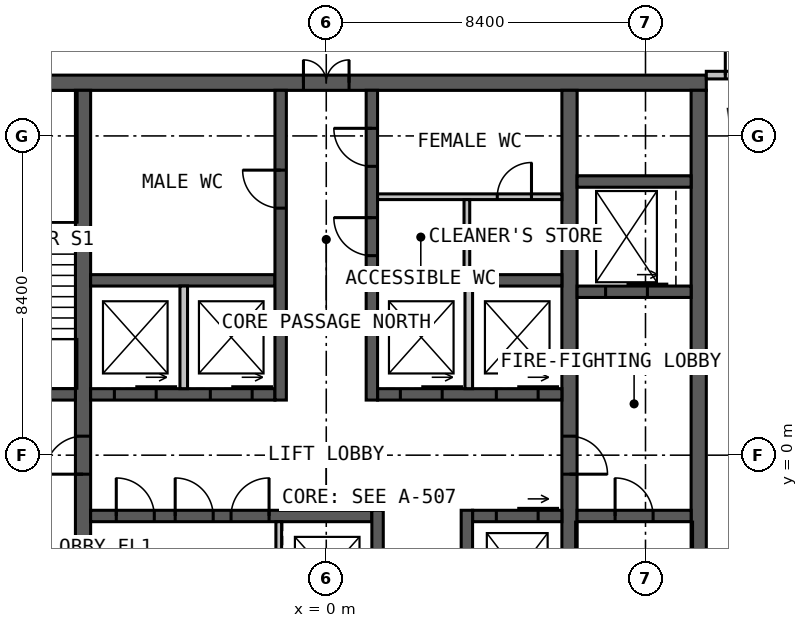
"""IFC4 building model, lengths in metres.
Left out: names, types, materials, properties, quantities, classifications, styles, units other than length and angle.
Written with IfcOpenShell. Run it as: python <this file> out.ifc"""

import sys

from ifc_helpers import new_model, si_unit, direction, frame, frame_2d, origin, place, context, subcontext, project, spatial, rectangle, extrude, element, fill, save


model = new_model("IFC4")
c1 = context("Model", 3, precision=1e-05, world=origin(), true_north=direction((0.0, 1.0)))
c2 = subcontext(c1, "Body", "Model", "MODEL_VIEW")
j1 = project(units=[si_unit("LENGTHUNIT", "METRE"), si_unit("PLANEANGLEUNIT", "RADIAN")], contexts=[c1])
p1 = place(None, origin())
s1 = spatial("IfcSite", under=j1, at=p1, CompositionType="ELEMENT")
p2 = place(p1, origin())
s2 = spatial("IfcBuilding", under=s1, at=p2, CompositionType="ELEMENT")
p3 = place(p2, frame((0.0, 0.0, 256.0)))
s3 = spatial("IfcBuildingStorey", under=s2, at=p3, CompositionType="ELEMENT", Elevation=256.0)
p4 = place(p3, frame((-10.0, 9.8, 0.0), z_axis=(0.0, 0.0, 1.0), x_axis=(1.0, 0.0, 0.0)))
e1 = element("IfcWall", 1, at=p4, inside=s3, PredefinedType="SOLIDWALL", context=c2, shape_type="SweptSolid", body=[
    extrude(rectangle(XDim=20.0, YDim=0.4, at=frame_2d((10.0, 0.0))), origin(), (0.0, 0.0, 1.0), 4.0),
])
p5 = place(p4, frame((9.4, 0.0, 0.0)))
e2 = element("IfcOpeningElement", 2, at=p5, cuts=e1, PredefinedType="OPENING", context=c2, shape_type="SweptSolid", body=[
    extrude(rectangle(XDim=1.2, YDim=2.2, at=frame_2d((0.6, 1.1))), frame((0.0, 0.21, 0.0), z_axis=(0.0, -1.0, 0.0), x_axis=(1.0, 0.0, 0.0)), (0.0, 0.0, 1.0), 0.42),
])
p6 = place(p3, frame((9.8, -9.6, 0.0), z_axis=(0.0, 0.0, 1.0), x_axis=(0.0, 1.0, 0.0)))
e3 = element("IfcWall", 3, at=p6, inside=s3, PredefinedType="SOLIDWALL", context=c2, shape_type="SweptSolid", body=[
    extrude(rectangle(XDim=19.2, YDim=0.4, at=frame_2d((9.6, 0.0))), origin(), (0.0, 0.0, 1.0), 4.0),
])
p7 = place(p3, frame((-6.4, -9.6, 0.0), z_axis=(0.0, 0.0, 1.0), x_axis=(0.0, 1.0, 0.0)))
e4 = element("IfcWall", 4, at=p7, inside=s3, PredefinedType="SOLIDWALL", context=c2, shape_type="SweptSolid", body=[
    extrude(rectangle(XDim=19.2, YDim=0.4, at=frame_2d((9.6, 0.0))), origin(), (0.0, 0.0, 1.0), 4.0),
])
p8 = place(p7, frame((9.1, 0.0, 0.0)))
e5 = element("IfcOpeningElement", 5, at=p8, cuts=e4, PredefinedType="OPENING", context=c2, shape_type="SweptSolid", body=[
    extrude(rectangle(XDim=1.0, YDim=2.2, at=frame_2d((0.5, 1.1))), frame((0.0, 0.21, 0.0), z_axis=(0.0, -1.0, 0.0), x_axis=(1.0, 0.0, 0.0)), (0.0, 0.0, 1.0), 0.42),
])
p9 = place(p3, frame((6.4, 9.6, 0.0), z_axis=(0.0, 0.0, 1.0), x_axis=(0.0, -1.0, 0.0)))
e6 = element("IfcWall", 6, at=p9, inside=s3, PredefinedType="SOLIDWALL", context=c2, shape_type="SweptSolid", body=[
    extrude(rectangle(XDim=19.2, YDim=0.4, at=frame_2d((9.6, 0.0))), origin(), (0.0, 0.0, 1.0), 4.0),
])
p10 = place(p9, frame((9.1, 0.0, 0.0)))
e7 = element("IfcOpeningElement", 7, at=p10, cuts=e6, PredefinedType="OPENING", context=c2, shape_type="SweptSolid", body=[
    extrude(rectangle(XDim=1.0, YDim=2.2, at=frame_2d((0.5, 1.1))), frame((0.0, 0.21, 0.0), z_axis=(0.0, -1.0, 0.0), x_axis=(1.0, 0.0, 0.0)), (0.0, 0.0, 1.0), 0.42),
])
p11 = place(p3, frame((-6.2, 1.6, 0.0), z_axis=(0.0, 0.0, 1.0), x_axis=(1.0, 0.0, 0.0)))
e8 = element("IfcWall", 8, at=p11, inside=s3, PredefinedType="SOLIDWALL", context=c2, shape_type="SweptSolid", body=[
    extrude(rectangle(XDim=4.85, YDim=0.3, at=frame_2d((2.425, 0.0))), origin(), (0.0, 0.0, 1.0), 4.0),
])
p12 = place(p11, frame((0.625, 0.0, 0.0)))
e9 = element("IfcOpeningElement", 9, at=p12, cuts=e8, PredefinedType="OPENING", context=c2, shape_type="SweptSolid", body=[
    extrude(rectangle(XDim=1.1, YDim=2.2, at=frame_2d((0.55, 1.1))), frame((0.0, 0.16, 0.0), z_axis=(0.0, -1.0, 0.0), x_axis=(1.0, 0.0, 0.0)), (0.0, 0.0, 1.0), 0.32),
])
p13 = place(p11, frame((3.15, 0.0, 0.0)))
e10 = element("IfcOpeningElement", 10, at=p13, cuts=e8, PredefinedType="OPENING", context=c2, shape_type="SweptSolid", body=[
    extrude(rectangle(XDim=1.1, YDim=2.2, at=frame_2d((0.55, 1.1))), frame((0.0, 0.16, 0.0), z_axis=(0.0, -1.0, 0.0), x_axis=(1.0, 0.0, 0.0)), (0.0, 0.0, 1.0), 0.32),
])
p14 = place(p3, frame((1.35, 1.6, 0.0), z_axis=(0.0, 0.0, 1.0), x_axis=(1.0, 0.0, 0.0)))
e11 = element("IfcWall", 11, at=p14, inside=s3, PredefinedType="SOLIDWALL", context=c2, shape_type="SweptSolid", body=[
    extrude(rectangle(XDim=4.85, YDim=0.3, at=frame_2d((2.425, 0.0))), origin(), (0.0, 0.0, 1.0), 4.0),
])
p15 = place(p14, frame((0.6, 0.0, 0.0)))
e12 = element("IfcOpeningElement", 12, at=p15, cuts=e11, PredefinedType="OPENING", context=c2, shape_type="SweptSolid", body=[
    extrude(rectangle(XDim=1.1, YDim=2.2, at=frame_2d((0.55, 1.1))), frame((0.0, 0.16, 0.0), z_axis=(0.0, -1.0, 0.0), x_axis=(1.0, 0.0, 0.0)), (0.0, 0.0, 1.0), 0.32),
])
p16 = place(p14, frame((3.125, 0.0, 0.0)))
e13 = element("IfcOpeningElement", 13, at=p16, cuts=e11, PredefinedType="OPENING", context=c2, shape_type="SweptSolid", body=[
    extrude(rectangle(XDim=1.1, YDim=2.2, at=frame_2d((0.55, 1.1))), frame((0.0, 0.16, 0.0), z_axis=(0.0, -1.0, 0.0), x_axis=(1.0, 0.0, 0.0)), (0.0, 0.0, 1.0), 0.32),
])
for number, where, z_axis, x_axis in (
    (14, (-6.2, 4.6, 0.0), (0.0, 0.0, 1.0), (1.0, 0.0, 0.0)),
    (15, (1.35, 4.6, 0.0), (0.0, 0.0, 1.0), (1.0, 0.0, 0.0)),
):
    element("IfcWall", number, at=place(p3, frame(where, z_axis=z_axis, x_axis=x_axis)), inside=s3, PredefinedType="SOLIDWALL", context=c2, shape_type="SweptSolid", body=[
        extrude(rectangle(XDim=4.85, YDim=0.3, at=frame_2d((2.425, 0.0))), origin(), (0.0, 0.0, 1.0), 4.0),
    ])
p17 = place(p3, frame((-1.2, 1.45, 0.0), z_axis=(0.0, 0.0, 1.0), x_axis=(0.0, 1.0, 0.0)))
e16 = element("IfcWall", 16, at=p17, inside=s3, PredefinedType="SOLIDWALL", context=c2, shape_type="SweptSolid", body=[
    extrude(rectangle(XDim=8.15, YDim=0.3, at=frame_2d((4.075, 0.0))), origin(), (0.0, 0.0, 1.0), 4.0),
])
p18 = place(p17, frame((5.05, 0.0, 0.0)))
e17 = element("IfcOpeningElement", 17, at=p18, cuts=e16, PredefinedType="OPENING", context=c2, shape_type="SweptSolid", body=[
    extrude(rectangle(XDim=1.0, YDim=2.2, at=frame_2d((0.5, 1.1))), frame((0.0, 0.16, 0.0), z_axis=(0.0, -1.0, 0.0), x_axis=(1.0, 0.0, 0.0)), (0.0, 0.0, 1.0), 0.32),
])
p19 = place(p3, frame((1.2, 1.45, 0.0), z_axis=(0.0, 0.0, 1.0), x_axis=(0.0, 1.0, 0.0)))
e18 = element("IfcWall", 18, at=p19, inside=s3, PredefinedType="SOLIDWALL", context=c2, shape_type="SweptSolid", body=[
    extrude(rectangle(XDim=8.15, YDim=0.3, at=frame_2d((4.075, 0.0))), origin(), (0.0, 0.0, 1.0), 4.0),
])
p20 = place(p19, frame((3.8, 0.0, 0.0)))
e19 = element("IfcOpeningElement", 19, at=p20, cuts=e18, PredefinedType="OPENING", context=c2, shape_type="SweptSolid", body=[
    extrude(rectangle(XDim=1.0, YDim=2.2, at=frame_2d((0.5, 1.1))), frame((0.0, 0.16, 0.0), z_axis=(0.0, -1.0, 0.0), x_axis=(1.0, 0.0, 0.0)), (0.0, 0.0, 1.0), 0.32),
])
p21 = place(p19, frame((6.15, 0.0, 0.0)))
e20 = element("IfcOpeningElement", 20, at=p21, cuts=e18, PredefinedType="OPENING", context=c2, shape_type="SweptSolid", body=[
    extrude(rectangle(XDim=1.0, YDim=2.2, at=frame_2d((0.5, 1.1))), frame((0.0, 0.16, 0.0), z_axis=(0.0, -1.0, 0.0), x_axis=(1.0, 0.0, 0.0)), (0.0, 0.0, 1.0), 0.32),
])
p22 = place(p3, frame((-6.2, -1.6, 0.0), z_axis=(0.0, 0.0, 1.0), x_axis=(1.0, 0.0, 0.0)))
e21 = element("IfcWall", 21, at=p22, inside=s3, PredefinedType="SOLIDWALL", context=c2, shape_type="SweptSolid", body=[
    extrude(rectangle(XDim=7.4, YDim=0.3, at=frame_2d((3.7, 0.0))), origin(), (0.0, 0.0, 1.0), 4.0),
])
p23 = place(p22, frame((0.675, 0.0, 0.0)))
e22 = element("IfcOpeningElement", 22, at=p23, cuts=e21, PredefinedType="OPENING", context=c2, shape_type="SweptSolid", body=[
    extrude(rectangle(XDim=1.0, YDim=2.2, at=frame_2d((0.5, 1.1))), frame((0.0, 0.16, 0.0), z_axis=(0.0, -1.0, 0.0), x_axis=(1.0, 0.0, 0.0)), (0.0, 0.0, 1.0), 0.32),
])
p24 = place(p22, frame((2.225, 0.0, 0.0)))
e23 = element("IfcOpeningElement", 23, at=p24, cuts=e21, PredefinedType="OPENING", context=c2, shape_type="SweptSolid", body=[
    extrude(rectangle(XDim=1.0, YDim=2.2, at=frame_2d((0.5, 1.1))), frame((0.0, 0.16, 0.0), z_axis=(0.0, -1.0, 0.0), x_axis=(1.0, 0.0, 0.0)), (0.0, 0.0, 1.0), 0.32),
])
p25 = place(p22, frame((3.695, 0.0, 0.0)))
e24 = element("IfcOpeningElement", 24, at=p25, cuts=e21, PredefinedType="OPENING", context=c2, shape_type="SweptSolid", body=[
    extrude(rectangle(XDim=1.0, YDim=2.2, at=frame_2d((0.5, 1.1))), frame((0.0, 0.16, 0.0), z_axis=(0.0, -1.0, 0.0), x_axis=(1.0, 0.0, 0.0)), (0.0, 0.0, 1.0), 0.32),
])
p26 = place(p3, frame((3.85, -1.6, 0.0), z_axis=(0.0, 0.0, 1.0), x_axis=(1.0, 0.0, 0.0)))
e25 = element("IfcWall", 25, at=p26, inside=s3, PredefinedType="SOLIDWALL", context=c2, shape_type="SweptSolid", body=[
    extrude(rectangle(XDim=2.35, YDim=0.3, at=frame_2d((1.175, 0.0))), origin(), (0.0, 0.0, 1.0), 4.0),
])
p27 = place(p26, frame((0.625, 0.0, 0.0)))
e26 = element("IfcOpeningElement", 26, at=p27, cuts=e25, PredefinedType="OPENING", context=c2, shape_type="SweptSolid", body=[
    extrude(rectangle(XDim=1.1, YDim=2.2, at=frame_2d((0.55, 1.1))), frame((0.0, 0.16, 0.0), z_axis=(0.0, -1.0, 0.0), x_axis=(1.0, 0.0, 0.0)), (0.0, 0.0, 1.0), 0.32),
])
p28 = place(p3, frame((1.35, -1.45, 0.0), z_axis=(0.0, 0.0, 1.0), x_axis=(0.0, -1.0, 0.0)))
e27 = element("IfcWall", 27, at=p28, inside=s3, PredefinedType="SOLIDWALL", context=c2, shape_type="SweptSolid", body=[
    extrude(rectangle(XDim=8.15, YDim=0.3, at=frame_2d((4.075, 0.0))), origin(), (0.0, 0.0, 1.0), 4.0),
])
p29 = place(p28, frame((6.0, 0.0, 0.0)))
e28 = element("IfcOpeningElement", 28, at=p29, cuts=e27, PredefinedType="OPENING", context=c2, shape_type="SweptSolid", body=[
    extrude(rectangle(XDim=1.0, YDim=2.2, at=frame_2d((0.5, 1.1))), frame((0.0, 0.16, 0.0), z_axis=(0.0, -1.0, 0.0), x_axis=(1.0, 0.0, 0.0)), (0.0, 0.0, 1.0), 0.32),
])
p30 = place(p28, frame((3.525, 0.0, 0.0)))
e29 = element("IfcOpeningElement", 29, at=p30, cuts=e27, PredefinedType="OPENING", context=c2, shape_type="SweptSolid", body=[
    extrude(rectangle(XDim=0.9, YDim=2.2, at=frame_2d((0.45, 1.1))), frame((0.0, 0.16, 0.0), z_axis=(0.0, -1.0, 0.0), x_axis=(1.0, 0.0, 0.0)), (0.0, 0.0, 1.0), 0.32),
])
p31 = place(p3, frame((3.7, -1.45, 0.0), z_axis=(0.0, 0.0, 1.0), x_axis=(0.0, -1.0, 0.0)))
e30 = element("IfcWall", 30, at=p31, inside=s3, PredefinedType="SOLIDWALL", context=c2, shape_type="SweptSolid", body=[
    extrude(rectangle(XDim=8.15, YDim=0.3, at=frame_2d((4.075, 0.0))), origin(), (0.0, 0.0, 1.0), 4.0),
])
p32 = place(p31, frame((5.1, 0.0, 0.0)))
e31 = element("IfcOpeningElement", 31, at=p32, cuts=e30, PredefinedType="OPENING", context=c2, shape_type="SweptSolid", body=[
    extrude(rectangle(XDim=0.9, YDim=2.2, at=frame_2d((0.45, 1.1))), frame((0.0, 0.16, 0.0), z_axis=(0.0, -1.0, 0.0), x_axis=(1.0, 0.0, 0.0)), (0.0, 0.0, 1.0), 0.32),
])
p33 = place(p3, frame((-9.6, 1.6, 0.0), z_axis=(0.0, 0.0, 1.0), x_axis=(1.0, 0.0, 0.0)))
e32 = element("IfcWall", 32, at=p33, inside=s3, PredefinedType="SOLIDWALL", context=c2, shape_type="SweptSolid", body=[
    extrude(rectangle(XDim=3.0, YDim=0.3, at=frame_2d((1.5, 0.0))), origin(), (0.0, 0.0, 1.0), 4.0),
])
p34 = place(p33, frame((1.0, 0.0, 0.0)))
e33 = element("IfcOpeningElement", 33, at=p34, cuts=e32, PredefinedType="OPENING", context=c2, shape_type="SweptSolid", body=[
    extrude(rectangle(XDim=1.0, YDim=2.2, at=frame_2d((0.5, 1.1))), frame((0.0, 0.16, 0.0), z_axis=(0.0, -1.0, 0.0), x_axis=(1.0, 0.0, 0.0)), (0.0, 0.0, 1.0), 0.32),
])
p35 = place(p3, frame((6.6, -1.6, 0.0), z_axis=(0.0, 0.0, 1.0), x_axis=(1.0, 0.0, 0.0)))
e34 = element("IfcWall", 34, at=p35, inside=s3, PredefinedType="SOLIDWALL", context=c2, shape_type="SweptSolid", body=[
    extrude(rectangle(XDim=3.0, YDim=0.3, at=frame_2d((1.5, 0.0))), origin(), (0.0, 0.0, 1.0), 4.0),
])
p36 = place(p35, frame((1.0, 0.0, 0.0)))
e35 = element("IfcOpeningElement", 35, at=p36, cuts=e34, PredefinedType="OPENING", context=c2, shape_type="SweptSolid", body=[
    extrude(rectangle(XDim=1.0, YDim=2.2, at=frame_2d((0.5, 1.1))), frame((0.0, 0.16, 0.0), z_axis=(0.0, -1.0, 0.0), x_axis=(1.0, 0.0, 0.0)), (0.0, 0.0, 1.0), 0.32),
])
p37 = place(p3, frame((6.6, 4.3, 0.0), z_axis=(0.0, 0.0, 1.0), x_axis=(1.0, 0.0, 0.0)))
e36 = element("IfcWall", 36, at=p37, inside=s3, PredefinedType="SOLIDWALL", context=c2, shape_type="SweptSolid", body=[
    extrude(rectangle(XDim=3.0, YDim=0.3, at=frame_2d((1.5, 0.0))), origin(), (0.0, 0.0, 1.0), 4.0),
])
p38 = place(p37, frame((0.75, 0.0, 0.0)))
e37 = element("IfcOpeningElement", 37, at=p38, cuts=e36, PredefinedType="OPENING", context=c2, shape_type="SweptSolid", body=[
    extrude(rectangle(XDim=1.1, YDim=2.2, at=frame_2d((0.55, 1.1))), frame((0.0, 0.16, 0.0), z_axis=(0.0, -1.0, 0.0), x_axis=(1.0, 0.0, 0.0)), (0.0, 0.0, 1.0), 0.32),
])
p39 = place(p3, frame((6.6, 7.2, 0.0), z_axis=(0.0, 0.0, 1.0), x_axis=(1.0, 0.0, 0.0)))
e38 = element("IfcWall", 38, at=p39, inside=s3, PredefinedType="SOLIDWALL", context=c2, shape_type="SweptSolid", body=[
    extrude(rectangle(XDim=3.0, YDim=0.3, at=frame_2d((1.5, 0.0))), origin(), (0.0, 0.0, 1.0), 4.0),
])
for number, where, z_axis, x_axis in (
    (39, (-3.75, 1.75, 0.0), (0.0, 0.0, 1.0), (0.0, 1.0, 0.0)),
    (40, (3.75, 1.75, 0.0), (0.0, 0.0, 1.0), (0.0, 1.0, 0.0)),
):
    element("IfcWall", number, at=place(p3, frame(where, z_axis=z_axis, x_axis=x_axis)), inside=s3, PredefinedType="SOLIDWALL", context=c2, shape_type="SweptSolid", body=[
        extrude(rectangle(XDim=2.7, YDim=0.2, at=frame_2d((1.35, 0.0))), origin(), (0.0, 0.0, 1.0), 3.75),
    ])
p40 = place(p3, frame((1.35, 6.8, 0.0), z_axis=(0.0, 0.0, 1.0), x_axis=(1.0, 0.0, 0.0)))
e41 = element("IfcWall", 41, at=p40, inside=s3, PredefinedType="PARTITIONING", context=c2, shape_type="SweptSolid", body=[
    extrude(rectangle(XDim=4.85, YDim=0.15, at=frame_2d((2.425, 0.0))), origin(), (0.0, 0.0, 1.0), 3.75),
])
p41 = place(p40, frame((3.15, 0.0, 0.0)))
e42 = element("IfcOpeningElement", 42, at=p41, cuts=e41, PredefinedType="OPENING", context=c2, shape_type="SweptSolid", body=[
    extrude(rectangle(XDim=0.9, YDim=2.2, at=frame_2d((0.45, 1.1))), frame((0.0, 0.085, 0.0), z_axis=(0.0, -1.0, 0.0), x_axis=(1.0, 0.0, 0.0)), (0.0, 0.0, 1.0), 0.17),
])
p42 = place(p3, frame((3.7, 4.75, 0.0), z_axis=(0.0, 0.0, 1.0), x_axis=(0.0, 1.0, 0.0)))
e43 = element("IfcWall", 43, at=p42, inside=s3, PredefinedType="PARTITIONING", context=c2, shape_type="SweptSolid", body=[
    extrude(rectangle(XDim=1.975, YDim=0.15, at=frame_2d((0.988, 0.0))), origin(), (0.0, 0.0, 1.0), 3.75),
])
p43 = place(p3, frame((-1.25, -1.75, 0.0), z_axis=(0.0, 0.0, 1.0), x_axis=(0.0, -1.0, 0.0)))
e44 = element("IfcWall", 44, at=p43, inside=s3, PredefinedType="PARTITIONING", context=c2, shape_type="SweptSolid", body=[
    extrude(rectangle(XDim=2.7, YDim=0.15, at=frame_2d((1.35, 0.0))), origin(), (0.0, 0.0, 1.0), 3.75),
])
p44 = place(p3, frame((10.0, 10.0, 0.0), z_axis=(0.0, 0.0, 1.0), x_axis=(1.0, 0.0, 0.0)))
e45 = element("IfcWall", 45, at=p44, inside=s3, PredefinedType="PARTITIONING", context=c2, shape_type="SweptSolid", body=[
    extrude(rectangle(XDim=2.0, YDim=0.2, at=frame_2d((1.0, 0.0))), origin(), (0.0, 0.0, 1.0), 3.8),
])
p45 = place(p44, frame((0.5, 0.0, 0.0)))
e46 = element("IfcOpeningElement", 46, at=p45, cuts=e45, PredefinedType="OPENING", context=c2, shape_type="SweptSolid", body=[
    extrude(rectangle(XDim=1.0, YDim=2.2, at=frame_2d((0.5, 1.1))), frame((0.0, 0.11, 0.0), z_axis=(0.0, -1.0, 0.0), x_axis=(1.0, 0.0, 0.0)), (0.0, 0.0, 1.0), 0.22),
])
p46 = place(p5, origin())
e47 = element("IfcDoor", 47, at=p46, inside=s3, OperationType="DOUBLE_DOOR_SINGLE_SWING", PredefinedType="DOOR", context=c2, shape_type="SweptSolid", body=[
    extrude(rectangle(XDim=1.2, YDim=2.2, at=frame_2d((0.6, 1.1))), frame((0.0, 0.025, 0.0), z_axis=(0.0, -1.0, 0.0), x_axis=(1.0, 0.0, 0.0)), (0.0, 0.0, 1.0), 0.05),
])
fill(e2, e47)
p47 = place(p8, origin())
e48 = element("IfcDoor", 48, at=p47, inside=s3, OperationType="SINGLE_SWING_LEFT", PredefinedType="DOOR", context=c2, shape_type="SweptSolid", body=[
    extrude(rectangle(XDim=1.0, YDim=2.2, at=frame_2d((0.5, 1.1))), frame((0.0, 0.025, 0.0), z_axis=(0.0, -1.0, 0.0), x_axis=(1.0, 0.0, 0.0)), (0.0, 0.0, 1.0), 0.05),
])
fill(e5, e48)
p48 = place(p10, origin())
e49 = element("IfcDoor", 49, at=p48, inside=s3, OperationType="SINGLE_SWING_RIGHT", PredefinedType="DOOR", context=c2, shape_type="SweptSolid", body=[
    extrude(rectangle(XDim=1.0, YDim=2.2, at=frame_2d((0.5, 1.1))), frame((0.0, 0.025, 0.0), z_axis=(0.0, -1.0, 0.0), x_axis=(1.0, 0.0, 0.0)), (0.0, 0.0, 1.0), 0.05),
])
fill(e7, e49)
p49 = place(p36, origin())
e50 = element("IfcDoor", 50, at=p49, inside=s3, OperationType="SINGLE_SWING_LEFT", PredefinedType="DOOR", context=c2, shape_type="SweptSolid", body=[
    extrude(rectangle(XDim=1.0, YDim=2.2, at=frame_2d((0.5, 1.1))), frame((0.0, 0.025, 0.0), z_axis=(0.0, -1.0, 0.0), x_axis=(1.0, 0.0, 0.0)), (0.0, 0.0, 1.0), 0.05),
])
fill(e35, e50)
p50 = place(p18, origin())
e51 = element("IfcDoor", 51, at=p50, inside=s3, OperationType="SINGLE_SWING_RIGHT", PredefinedType="DOOR", context=c2, shape_type="SweptSolid", body=[
    extrude(rectangle(XDim=1.0, YDim=2.2, at=frame_2d((0.5, 1.1))), frame((0.0, 0.025, 0.0), z_axis=(0.0, -1.0, 0.0), x_axis=(1.0, 0.0, 0.0)), (0.0, 0.0, 1.0), 0.05),
])
fill(e17, e51)
p51 = place(p20, origin())
e52 = element("IfcDoor", 52, at=p51, inside=s3, OperationType="SINGLE_SWING_RIGHT", PredefinedType="DOOR", context=c2, shape_type="SweptSolid", body=[
    extrude(rectangle(XDim=1.0, YDim=2.2, at=frame_2d((0.5, 1.1))), frame((0.0, 0.025, 0.0), z_axis=(0.0, -1.0, 0.0), x_axis=(1.0, 0.0, 0.0)), (0.0, 0.0, 1.0), 0.05),
])
fill(e19, e52)
p52 = place(p21, origin())
e53 = element("IfcDoor", 53, at=p52, inside=s3, OperationType="SINGLE_SWING_RIGHT", PredefinedType="DOOR", context=c2, shape_type="SweptSolid", body=[
    extrude(rectangle(XDim=1.0, YDim=2.2, at=frame_2d((0.5, 1.1))), frame((0.0, 0.025, 0.0), z_axis=(0.0, -1.0, 0.0), x_axis=(1.0, 0.0, 0.0)), (0.0, 0.0, 1.0), 0.05),
])
fill(e20, e53)
p53 = place(p41, origin())
e54 = element("IfcDoor", 54, at=p53, inside=s3, OperationType="SINGLE_SWING_RIGHT", PredefinedType="DOOR", context=c2, shape_type="SweptSolid", body=[
    extrude(rectangle(XDim=0.9, YDim=2.2, at=frame_2d((0.45, 1.1))), frame((0.0, 0.025, 0.0), z_axis=(0.0, -1.0, 0.0), x_axis=(1.0, 0.0, 0.0)), (0.0, 0.0, 1.0), 0.05),
])
fill(e42, e54)
p54 = place(p23, origin())
e55 = element("IfcDoor", 55, at=p54, inside=s3, OperationType="SINGLE_SWING_LEFT", PredefinedType="DOOR", context=c2, shape_type="SweptSolid", body=[
    extrude(rectangle(XDim=1.0, YDim=2.2, at=frame_2d((0.5, 1.1))), frame((0.0, 0.025, 0.0), z_axis=(0.0, -1.0, 0.0), x_axis=(1.0, 0.0, 0.0)), (0.0, 0.0, 1.0), 0.05),
])
fill(e22, e55)
p55 = place(p24, origin())
e56 = element("IfcDoor", 56, at=p55, inside=s3, OperationType="SINGLE_SWING_LEFT", PredefinedType="DOOR", context=c2, shape_type="SweptSolid", body=[
    extrude(rectangle(XDim=1.0, YDim=2.2, at=frame_2d((0.5, 1.1))), frame((0.0, 0.025, 0.0), z_axis=(0.0, -1.0, 0.0), x_axis=(1.0, 0.0, 0.0)), (0.0, 0.0, 1.0), 0.05),
])
fill(e23, e56)
p56 = place(p25, origin())
e57 = element("IfcDoor", 57, at=p56, inside=s3, OperationType="SINGLE_SWING_RIGHT", PredefinedType="DOOR", context=c2, shape_type="SweptSolid", body=[
    extrude(rectangle(XDim=1.0, YDim=2.2, at=frame_2d((0.5, 1.1))), frame((0.0, 0.025, 0.0), z_axis=(0.0, -1.0, 0.0), x_axis=(1.0, 0.0, 0.0)), (0.0, 0.0, 1.0), 0.05),
])
fill(e24, e57)
p57 = place(p12, origin())
e58 = element("IfcDoor", 58, at=p57, inside=s3, OperationType="SLIDING_TO_LEFT", PredefinedType="DOOR", context=c2, shape_type="SweptSolid", body=[
    extrude(rectangle(XDim=1.1, YDim=2.2, at=frame_2d((0.55, 1.1))), frame((0.0, 0.025, 0.0), z_axis=(0.0, -1.0, 0.0), x_axis=(1.0, 0.0, 0.0)), (0.0, 0.0, 1.0), 0.05),
])
fill(e9, e58)
p58 = place(p13, origin())
e59 = element("IfcDoor", 59, at=p58, inside=s3, OperationType="SLIDING_TO_LEFT", PredefinedType="DOOR", context=c2, shape_type="SweptSolid", body=[
    extrude(rectangle(XDim=1.1, YDim=2.2, at=frame_2d((0.55, 1.1))), frame((0.0, 0.025, 0.0), z_axis=(0.0, -1.0, 0.0), x_axis=(1.0, 0.0, 0.0)), (0.0, 0.0, 1.0), 0.05),
])
fill(e10, e59)
p59 = place(p15, origin())
e60 = element("IfcDoor", 60, at=p59, inside=s3, OperationType="SLIDING_TO_LEFT", PredefinedType="DOOR", context=c2, shape_type="SweptSolid", body=[
    extrude(rectangle(XDim=1.1, YDim=2.2, at=frame_2d((0.55, 1.1))), frame((0.0, 0.025, 0.0), z_axis=(0.0, -1.0, 0.0), x_axis=(1.0, 0.0, 0.0)), (0.0, 0.0, 1.0), 0.05),
])
fill(e12, e60)
p60 = place(p16, origin())
e61 = element("IfcDoor", 61, at=p60, inside=s3, OperationType="SLIDING_TO_LEFT", PredefinedType="DOOR", context=c2, shape_type="SweptSolid", body=[
    extrude(rectangle(XDim=1.1, YDim=2.2, at=frame_2d((0.55, 1.1))), frame((0.0, 0.025, 0.0), z_axis=(0.0, -1.0, 0.0), x_axis=(1.0, 0.0, 0.0)), (0.0, 0.0, 1.0), 0.05),
])
fill(e13, e61)
p61 = place(p27, origin())
e62 = element("IfcDoor", 62, at=p61, inside=s3, OperationType="SLIDING_TO_LEFT", PredefinedType="DOOR", context=c2, shape_type="SweptSolid", body=[
    extrude(rectangle(XDim=1.1, YDim=2.2, at=frame_2d((0.55, 1.1))), frame((0.0, 0.025, 0.0), z_axis=(0.0, -1.0, 0.0), x_axis=(1.0, 0.0, 0.0)), (0.0, 0.0, 1.0), 0.05),
])
fill(e26, e62)
p62 = place(p38, origin())
e63 = element("IfcDoor", 63, at=p62, inside=s3, OperationType="SLIDING_TO_LEFT", PredefinedType="DOOR", context=c2, shape_type="SweptSolid", body=[
    extrude(rectangle(XDim=1.1, YDim=2.2, at=frame_2d((0.55, 1.1))), frame((0.0, 0.025, 0.0), z_axis=(0.0, -1.0, 0.0), x_axis=(1.0, 0.0, 0.0)), (0.0, 0.0, 1.0), 0.05),
])
fill(e37, e63)
p63 = place(p45, origin())
e64 = element("IfcDoor", 64, at=p63, inside=s3, OperationType="SINGLE_SWING_LEFT", PredefinedType="DOOR", context=c2, shape_type="SweptSolid", body=[
    extrude(rectangle(XDim=1.0, YDim=2.2, at=frame_2d((0.5, 1.1))), frame((0.0, 0.025, 0.0), z_axis=(0.0, -1.0, 0.0), x_axis=(1.0, 0.0, 0.0)), (0.0, 0.0, 1.0), 0.05),
])
fill(e46, e64)
save(model, sys.argv[1])
